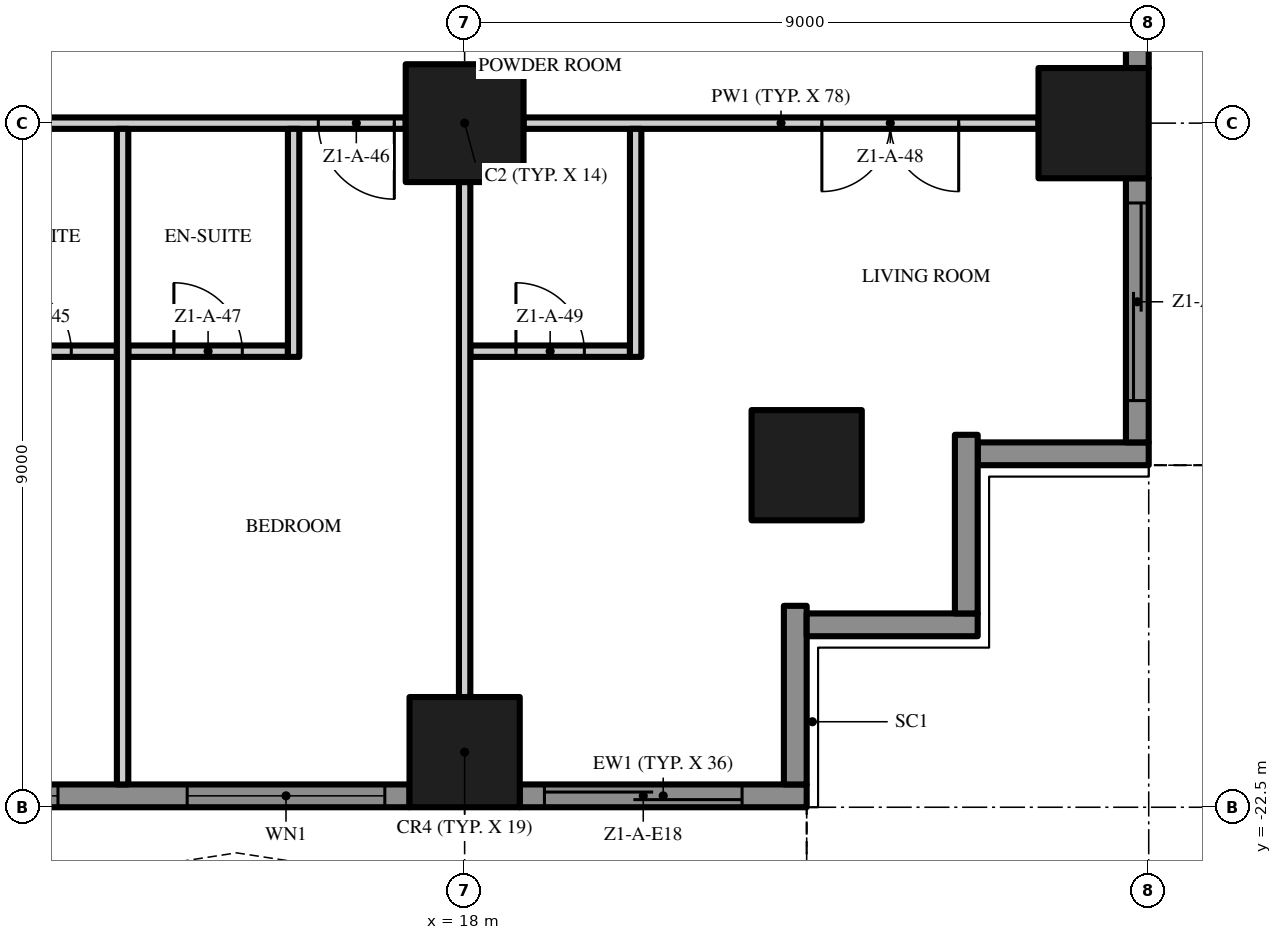
"""IFC4 building model, lengths in metres.
Left out: names, types, materials, properties, quantities, classifications, styles, units other than length and angle.
Written with IfcOpenShell. Run it as: python <this file> out.ifc"""

import sys

from ifc_helpers import new_model, si_unit, direction, frame, frame_2d, origin, origin_2d, place, context, subcontext, project, spatial, polyline, rectangle, outline, extrude, element, fill, save


model = new_model("IFC4")
c1 = context("Model", 3, precision=1e-05, world=origin(), true_north=direction((0.0, 1.0)))
c2 = subcontext(c1, "Body", "Model", "MODEL_VIEW")
j1 = project(units=[si_unit("LENGTHUNIT", "METRE"), si_unit("PLANEANGLEUNIT", "RADIAN")], contexts=[c1])
p1 = place(None, origin())
s1 = spatial("IfcSite", under=j1, at=p1, CompositionType="ELEMENT")
p2 = place(p1, origin())
s2 = spatial("IfcBuilding", under=s1, at=p2, CompositionType="ELEMENT")
p3 = place(p2, frame((0.0, 0.0, 22.6)))
s3 = spatial("IfcBuildingStorey", under=s2, at=p3, CompositionType="ELEMENT", Elevation=22.6)
p4 = place(p3, frame((18.0, -13.5, 0.0), z_axis=(0.0, 0.0, 1.0), x_axis=(1.0, 0.0, 0.0)))
e1 = element("IfcColumn", 1, at=p4, inside=s3, PredefinedType="COLUMN", context=c2, shape_type="SweptSolid", body=[
    extrude(rectangle(XDim=1.55, YDim=1.55, at=origin_2d()), origin(), (0.0, 0.0, 1.0), 3.5),
])
for number, where, z_axis, x_axis in (
    (2, (18.0, -21.775, 0.0), (0.0, 0.0, 1.0), (1.0, 0.0, 0.0)),
    (3, (26.275, -13.5, 0.0), (0.0, 0.0, 1.0), (1.0, 0.0, 0.0)),
    (4, (22.5, -18.0, 0.0), (0.0, 0.0, 1.0), (1.0, 0.0, 0.0)),
):
    element("IfcColumn", number, at=place(p3, frame(where, z_axis=z_axis, x_axis=x_axis)), inside=s3, PredefinedType="COLUMN", context=c2, shape_type="SweptSolid", body=[
        extrude(rectangle(XDim=1.45, YDim=1.45, at=origin_2d()), origin(), (0.0, 0.0, 1.0), 3.5),
    ])
p5 = place(p3, frame((17.275, -22.35, 0.0), z_axis=(0.0, 0.0, 1.0), x_axis=(-1.0, 0.0, 0.0)))
e5 = element("IfcWall", 5, at=p5, inside=s3, PredefinedType="SOLIDWALL", context=c2, shape_type="SweptSolid", body=[
    extrude(rectangle(XDim=7.55, YDim=0.3, at=frame_2d((3.775, 0.0))), origin(), (0.0, 0.0, 1.0), 3.5),
])
p6 = place(p5, frame((4.625, 0.0, 0.45)))
e6 = element("IfcOpeningElement", 6, at=p6, cuts=e5, PredefinedType="OPENING", context=c2, shape_type="SweptSolid", body=[
    extrude(rectangle(XDim=2.6, YDim=2.65, at=frame_2d((1.3, 1.325))), frame((0.0, 0.16, 0.0), z_axis=(0.0, -1.0, 0.0), x_axis=(1.0, 0.0, 0.0)), (0.0, 0.0, 1.0), 0.32),
])
p7 = place(p5, frame((0.325, 0.0, 0.45)))
e7 = element("IfcOpeningElement", 7, at=p7, cuts=e5, PredefinedType="OPENING", context=c2, shape_type="SweptSolid", body=[
    extrude(rectangle(XDim=2.6, YDim=2.65, at=frame_2d((1.3, 1.325))), frame((0.0, 0.16, 0.0), z_axis=(0.0, -1.0, 0.0), x_axis=(1.0, 0.0, 0.0)), (0.0, 0.0, 1.0), 0.32),
])
p8 = place(p3, frame((22.5, -22.35, 0.0), z_axis=(0.0, 0.0, 1.0), x_axis=(-1.0, 0.0, 0.0)))
e8 = element("IfcWall", 8, at=p8, inside=s3, PredefinedType="SOLIDWALL", context=c2, shape_type="SweptSolid", body=[
    extrude(rectangle(XDim=3.775, YDim=0.3, at=frame_2d((1.887, 0.0))), origin(), (0.0, 0.0, 1.0), 3.5),
])
p9 = place(p8, frame((0.85, 0.0, 0.0)))
e9 = element("IfcOpeningElement", 9, at=p9, cuts=e8, PredefinedType="OPENING", context=c2, shape_type="SweptSolid", body=[
    extrude(rectangle(XDim=2.6, YDim=2.4, at=frame_2d((1.3, 1.2))), frame((0.0, 0.16, 0.0), z_axis=(0.0, -1.0, 0.0), x_axis=(1.0, 0.0, 0.0)), (0.0, 0.0, 1.0), 0.32),
])
p10 = place(p3, frame((22.35, -19.85, 0.0), z_axis=(0.0, 0.0, 1.0), x_axis=(0.0, -1.0, 0.0)))
e10 = element("IfcWall", 10, at=p10, inside=s3, PredefinedType="SOLIDWALL", context=c2, shape_type="SweptSolid", body=[
    extrude(rectangle(XDim=2.35, YDim=0.3, at=frame_2d((1.175, 0.0))), origin(), (0.0, 0.0, 1.0), 3.5),
])
p11 = place(p3, frame((24.75, -20.1, 0.0), z_axis=(0.0, 0.0, 1.0), x_axis=(-1.0, 0.0, 0.0)))
e11 = element("IfcWall", 11, at=p11, inside=s3, PredefinedType="SOLIDWALL", context=c2, shape_type="SweptSolid", body=[
    extrude(rectangle(XDim=2.25, YDim=0.3, at=frame_2d((1.125, 0.0))), origin(), (0.0, 0.0, 1.0), 3.5),
])
p12 = place(p3, frame((24.6, -17.6, 0.0), z_axis=(0.0, 0.0, 1.0), x_axis=(0.0, -1.0, 0.0)))
e12 = element("IfcWall", 12, at=p12, inside=s3, PredefinedType="SOLIDWALL", context=c2, shape_type="SweptSolid", body=[
    extrude(rectangle(XDim=2.35, YDim=0.3, at=frame_2d((1.175, 0.0))), origin(), (0.0, 0.0, 1.0), 3.5),
])
p13 = place(p3, frame((27.0, -17.85, 0.0), z_axis=(0.0, 0.0, 1.0), x_axis=(-1.0, 0.0, 0.0)))
e13 = element("IfcWall", 13, at=p13, inside=s3, PredefinedType="SOLIDWALL", context=c2, shape_type="SweptSolid", body=[
    extrude(rectangle(XDim=2.25, YDim=0.3, at=frame_2d((1.125, 0.0))), origin(), (0.0, 0.0, 1.0), 3.5),
])
p14 = place(p3, frame((26.85, -14.225, 0.0), z_axis=(0.0, 0.0, 1.0), x_axis=(0.0, -1.0, 0.0)))
e14 = element("IfcWall", 14, at=p14, inside=s3, PredefinedType="SOLIDWALL", context=c2, shape_type="SweptSolid", body=[
    extrude(rectangle(XDim=3.475, YDim=0.3, at=frame_2d((1.738, 0.0))), origin(), (0.0, 0.0, 1.0), 3.5),
])
p15 = place(p14, frame((0.325, 0.0, 0.0)))
e15 = element("IfcOpeningElement", 15, at=p15, cuts=e14, PredefinedType="OPENING", context=c2, shape_type="SweptSolid", body=[
    extrude(rectangle(XDim=2.6, YDim=2.4, at=frame_2d((1.3, 1.2))), frame((0.0, 0.16, 0.0), z_axis=(0.0, -1.0, 0.0), x_axis=(1.0, 0.0, 0.0)), (0.0, 0.0, 1.0), 0.32),
])
p16 = place(p3, frame((26.85, -5.225, 0.0), z_axis=(0.0, 0.0, 1.0), x_axis=(0.0, -1.0, 0.0)))
e16 = element("IfcWall", 16, at=p16, inside=s3, PredefinedType="SOLIDWALL", context=c2, shape_type="SweptSolid", body=[
    extrude(rectangle(XDim=7.55, YDim=0.3, at=frame_2d((3.775, 0.0))), origin(), (0.0, 0.0, 1.0), 3.5),
])
p17 = place(p16, frame((4.625, 0.0, 0.45)))
e17 = element("IfcOpeningElement", 17, at=p17, cuts=e16, PredefinedType="OPENING", context=c2, shape_type="SweptSolid", body=[
    extrude(rectangle(XDim=2.6, YDim=2.65, at=frame_2d((1.3, 1.325))), frame((0.0, 0.16, 0.0), z_axis=(0.0, -1.0, 0.0), x_axis=(1.0, 0.0, 0.0)), (0.0, 0.0, 1.0), 0.32),
])
p18 = place(p16, frame((0.325, 0.0, 0.45)))
e18 = element("IfcOpeningElement", 18, at=p18, cuts=e16, PredefinedType="OPENING", context=c2, shape_type="SweptSolid", body=[
    extrude(rectangle(XDim=2.6, YDim=2.65, at=frame_2d((1.3, 1.325))), frame((0.0, 0.16, 0.0), z_axis=(0.0, -1.0, 0.0), x_axis=(1.0, 0.0, 0.0)), (0.0, 0.0, 1.0), 0.32),
])
p19 = place(p3, origin())
e19 = element("IfcWall", 19, at=p19, inside=s3, PredefinedType="USERDEFINED", context=c2, shape_type="SweptSolid", body=[
    extrude(outline(polyline([(-22.5, -25.5), (-21.0, -25.271), (-19.5, -24.671), (-18.0, -23.929), (-16.5, -23.329), (-15.0, -23.1), (-13.5, -23.329), (-12.0, -23.929), (-10.5, -24.671), (-9.0, -25.271), (-7.5, -25.5), (-6.0, -25.271), (-4.5, -24.671), (-3.0, -23.929), (-1.5, -23.329), (0.0, -23.1), (1.5, -23.329), (3.0, -23.929), (4.5, -24.671), (6.0, -25.271), (7.5, -25.5), (9.0, -25.271), (10.5, -24.671), (12.0, -23.929), (13.5, -23.329), (15.0, -23.1), (16.5, -23.329), (18.0, -23.929), (19.5, -24.671), (21.0, -25.271), (22.5, -25.5), (22.538, -25.253), (21.066, -25.028), (19.602, -24.442), (18.102, -23.701), (16.566, -23.086), (15.0, -22.847), (13.434, -23.086), (11.898, -23.701), (10.398, -24.442), (8.934, -25.028), (7.5, -25.247), (6.066, -25.028), (4.602, -24.442), (3.102, -23.701), (1.566, -23.086), (0.0, -22.847), (-1.566, -23.086), (-3.102, -23.701), (-4.602, -24.442), (-6.066, -25.028), (-7.5, -25.247), (-8.934, -25.028), (-10.398, -24.442), (-11.898, -23.701), (-13.434, -23.086), (-15.0, -22.847), (-16.566, -23.086), (-18.102, -23.701), (-19.602, -24.442), (-21.066, -25.028), (-22.538, -25.253), (-22.5, -25.5)])), origin(), (0.0, 0.0, 1.0), 0.9),
])
p20 = place(p3, origin())
e20 = element("IfcWall", 20, at=p20, inside=s3, PredefinedType="USERDEFINED", context=c2, shape_type="SweptSolid", body=[
    extrude(outline(polyline([(30.0, -18.0), (29.771, -16.5), (29.171, -15.0), (28.429, -13.5), (27.829, -12.0), (27.6, -10.5), (27.829, -9.0), (28.429, -7.5), (29.171, -6.0), (29.771, -4.5), (30.0, -3.0), (29.771, -1.5), (29.171, 0.0), (28.429, 1.5), (27.829, 3.0), (27.6, 4.5), (27.829, 6.0), (28.429, 7.5), (29.171, 9.0), (29.771, 10.5), (30.0, 12.0), (29.771, 13.5), (29.171, 15.0), (28.429, 16.5), (27.829, 18.0), (27.597, 17.907), (28.201, 16.398), (28.942, 14.898), (29.528, 13.434), (29.747, 12.0), (29.528, 10.566), (28.942, 9.102), (28.201, 7.602), (27.586, 6.066), (27.347, 4.5), (27.586, 2.934), (28.201, 1.398), (28.942, -0.102), (29.528, -1.566), (29.747, -3.0), (29.528, -4.434), (28.942, -5.898), (28.201, -7.398), (27.586, -8.934), (27.347, -10.5), (27.586, -12.066), (28.201, -13.602), (28.942, -15.102), (29.528, -16.566), (29.753, -18.038), (30.0, -18.0)])), origin(), (0.0, 0.0, 1.0), 0.9),
])
p21 = place(p3, frame((11.325, -16.5, 0.0), z_axis=(0.0, 0.0, 1.0), x_axis=(1.0, 0.0, 0.0)))
e21 = element("IfcWall", 21, at=p21, inside=s3, PredefinedType="PARTITIONING", context=c2, shape_type="SweptSolid", body=[
    extrude(rectangle(XDim=2.1, YDim=0.15, at=frame_2d((1.05, 0.0))), origin(), (0.0, 0.0, 1.0), 3.5),
])
p22 = place(p21, frame((0.6, 0.0, 0.0)))
e22 = element("IfcOpeningElement", 22, at=p22, cuts=e21, PredefinedType="OPENING", context=c2, shape_type="SweptSolid", body=[
    extrude(rectangle(XDim=0.9, YDim=2.1, at=frame_2d((0.45, 1.05))), frame((0.0, 0.085, 0.0), z_axis=(0.0, -1.0, 0.0), x_axis=(1.0, 0.0, 0.0)), (0.0, 0.0, 1.0), 0.17),
])
p23 = place(p3, frame((13.575, -16.5, 0.0), z_axis=(0.0, 0.0, 1.0), x_axis=(1.0, 0.0, 0.0)))
e23 = element("IfcWall", 23, at=p23, inside=s3, PredefinedType="PARTITIONING", context=c2, shape_type="SweptSolid", body=[
    extrude(rectangle(XDim=2.1, YDim=0.15, at=frame_2d((1.05, 0.0))), origin(), (0.0, 0.0, 1.0), 3.5),
])
p24 = place(p23, frame((0.6, 0.0, 0.0)))
e24 = element("IfcOpeningElement", 24, at=p24, cuts=e23, PredefinedType="OPENING", context=c2, shape_type="SweptSolid", body=[
    extrude(rectangle(XDim=0.9, YDim=2.1, at=frame_2d((0.45, 1.05))), frame((0.0, 0.085, 0.0), z_axis=(0.0, -1.0, 0.0), x_axis=(1.0, 0.0, 0.0)), (0.0, 0.0, 1.0), 0.17),
])
p25 = place(p3, frame((18.075, -16.5, 0.0), z_axis=(0.0, 0.0, 1.0), x_axis=(1.0, 0.0, 0.0)))
e25 = element("IfcWall", 25, at=p25, inside=s3, PredefinedType="PARTITIONING", context=c2, shape_type="SweptSolid", body=[
    extrude(rectangle(XDim=2.1, YDim=0.15, at=frame_2d((1.05, 0.0))), origin(), (0.0, 0.0, 1.0), 3.5),
])
p26 = place(p25, frame((0.6, 0.0, 0.0)))
e26 = element("IfcOpeningElement", 26, at=p26, cuts=e25, PredefinedType="OPENING", context=c2, shape_type="SweptSolid", body=[
    extrude(rectangle(XDim=0.9, YDim=2.1, at=frame_2d((0.45, 1.05))), frame((0.0, 0.085, 0.0), z_axis=(0.0, -1.0, 0.0), x_axis=(1.0, 0.0, 0.0)), (0.0, 0.0, 1.0), 0.17),
])
p27 = place(p3, frame((17.225, -13.5, 0.0), z_axis=(0.0, 0.0, 1.0), x_axis=(-1.0, 0.0, 0.0)))
e27 = element("IfcWall", 27, at=p27, inside=s3, PredefinedType="PARTITIONING", context=c2, shape_type="SweptSolid", body=[
    extrude(rectangle(XDim=7.45, YDim=0.15, at=frame_2d((3.725, 0.0))), origin(), (0.0, 0.0, 1.0), 3.5),
])
p28 = place(p27, frame((6.3, 0.0, 0.0)))
e28 = element("IfcOpeningElement", 28, at=p28, cuts=e27, PredefinedType="OPENING", context=c2, shape_type="SweptSolid", body=[
    extrude(rectangle(XDim=1.0, YDim=2.4, at=frame_2d((0.5, 1.2))), frame((0.0, 0.085, 0.0), z_axis=(0.0, -1.0, 0.0), x_axis=(1.0, 0.0, 0.0)), (0.0, 0.0, 1.0), 0.17),
])
p29 = place(p27, frame((0.15, 0.0, 0.0)))
e29 = element("IfcOpeningElement", 29, at=p29, cuts=e27, PredefinedType="OPENING", context=c2, shape_type="SweptSolid", body=[
    extrude(rectangle(XDim=1.0, YDim=2.4, at=frame_2d((0.5, 1.2))), frame((0.0, 0.085, 0.0), z_axis=(0.0, -1.0, 0.0), x_axis=(1.0, 0.0, 0.0)), (0.0, 0.0, 1.0), 0.17),
])
p30 = place(p3, frame((25.55, -13.5, 0.0), z_axis=(0.0, 0.0, 1.0), x_axis=(-1.0, 0.0, 0.0)))
e30 = element("IfcWall", 30, at=p30, inside=s3, PredefinedType="PARTITIONING", context=c2, shape_type="SweptSolid", body=[
    extrude(rectangle(XDim=6.775, YDim=0.15, at=frame_2d((3.388, 0.0))), origin(), (0.0, 0.0, 1.0), 3.5),
])
p31 = place(p30, frame((1.05, 0.0, 0.0)))
e31 = element("IfcOpeningElement", 31, at=p31, cuts=e30, PredefinedType="OPENING", context=c2, shape_type="SweptSolid", body=[
    extrude(rectangle(XDim=1.8, YDim=2.4, at=frame_2d((0.9, 1.2))), frame((0.0, 0.085, 0.0), z_axis=(0.0, -1.0, 0.0), x_axis=(1.0, 0.0, 0.0)), (0.0, 0.0, 1.0), 0.17),
])
p32 = place(p3, frame((13.5, -22.2, 0.0), z_axis=(0.0, 0.0, 1.0), x_axis=(0.0, 1.0, 0.0)))
e32 = element("IfcWall", 32, at=p32, inside=s3, PredefinedType="PARTITIONING", context=c2, shape_type="SweptSolid", body=[
    extrude(rectangle(XDim=8.625, YDim=0.15, at=frame_2d((4.312, 0.0))), origin(), (0.0, 0.0, 1.0), 3.5),
])
p33 = place(p3, frame((15.75, -16.575, 0.0), z_axis=(0.0, 0.0, 1.0), x_axis=(0.0, 1.0, 0.0)))
e33 = element("IfcWall", 33, at=p33, inside=s3, PredefinedType="PARTITIONING", context=c2, shape_type="SweptSolid", body=[
    extrude(rectangle(XDim=3.0, YDim=0.15, at=frame_2d((1.5, 0.0))), origin(), (0.0, 0.0, 1.0), 3.5),
])
p34 = place(p3, frame((18.0, -21.05, 0.0), z_axis=(0.0, 0.0, 1.0), x_axis=(0.0, 1.0, 0.0)))
e34 = element("IfcWall", 34, at=p34, inside=s3, PredefinedType="PARTITIONING", context=c2, shape_type="SweptSolid", body=[
    extrude(rectangle(XDim=6.775, YDim=0.15, at=frame_2d((3.388, 0.0))), origin(), (0.0, 0.0, 1.0), 3.5),
])
p35 = place(p3, frame((20.25, -16.575, 0.0), z_axis=(0.0, 0.0, 1.0), x_axis=(0.0, 1.0, 0.0)))
e35 = element("IfcWall", 35, at=p35, inside=s3, PredefinedType="PARTITIONING", context=c2, shape_type="SweptSolid", body=[
    extrude(rectangle(XDim=3.0, YDim=0.15, at=frame_2d((1.5, 0.0))), origin(), (0.0, 0.0, 1.0), 3.5),
])
p36 = place(p6, origin())
e36 = element("IfcWindow", 36, at=p36, inside=s3, PartitioningType="SINGLE_PANEL", PredefinedType="WINDOW", context=c2, shape_type="SweptSolid", body=[
    extrude(rectangle(XDim=2.6, YDim=2.65, at=frame_2d((1.3, 1.325))), frame((0.0, 0.03, 0.0), z_axis=(0.0, -1.0, 0.0), x_axis=(1.0, 0.0, 0.0)), (0.0, 0.0, 1.0), 0.06),
])
fill(e6, e36)
p37 = place(p7, origin())
e37 = element("IfcWindow", 37, at=p37, inside=s3, PartitioningType="SINGLE_PANEL", PredefinedType="WINDOW", context=c2, shape_type="SweptSolid", body=[
    extrude(rectangle(XDim=2.6, YDim=2.65, at=frame_2d((1.3, 1.325))), frame((0.0, 0.03, 0.0), z_axis=(0.0, -1.0, 0.0), x_axis=(1.0, 0.0, 0.0)), (0.0, 0.0, 1.0), 0.06),
])
fill(e7, e37)
p38 = place(p9, origin())
e38 = element("IfcDoor", 38, at=p38, inside=s3, OperationType="SINGLE_SWING_LEFT", PredefinedType="DOOR", context=c2, shape_type="SweptSolid", body=[
    extrude(rectangle(XDim=2.6, YDim=2.4, at=frame_2d((1.3, 1.2))), frame((0.0, 0.025, 0.0), z_axis=(0.0, -1.0, 0.0), x_axis=(1.0, 0.0, 0.0)), (0.0, 0.0, 1.0), 0.05),
])
fill(e9, e38)
p39 = place(p15, origin())
e39 = element("IfcDoor", 39, at=p39, inside=s3, OperationType="SINGLE_SWING_LEFT", PredefinedType="DOOR", context=c2, shape_type="SweptSolid", body=[
    extrude(rectangle(XDim=2.6, YDim=2.4, at=frame_2d((1.3, 1.2))), frame((0.0, 0.025, 0.0), z_axis=(0.0, -1.0, 0.0), x_axis=(1.0, 0.0, 0.0)), (0.0, 0.0, 1.0), 0.05),
])
fill(e15, e39)
p40 = place(p22, origin())
e40 = element("IfcDoor", 40, at=p40, inside=s3, OperationType="SINGLE_SWING_LEFT", PredefinedType="DOOR", context=c2, shape_type="SweptSolid", body=[
    extrude(rectangle(XDim=0.9, YDim=2.1, at=frame_2d((0.45, 1.05))), frame((0.0, 0.025, 0.0), z_axis=(0.0, -1.0, 0.0), x_axis=(1.0, 0.0, 0.0)), (0.0, 0.0, 1.0), 0.05),
])
fill(e22, e40)
p41 = place(p29, origin())
e41 = element("IfcDoor", 41, at=p41, inside=s3, OperationType="SINGLE_SWING_LEFT", PredefinedType="DOOR", context=c2, shape_type="SweptSolid", body=[
    extrude(rectangle(XDim=1.0, YDim=2.4, at=frame_2d((0.5, 1.2))), frame((0.0, 0.025, 0.0), z_axis=(0.0, -1.0, 0.0), x_axis=(1.0, 0.0, 0.0)), (0.0, 0.0, 1.0), 0.05),
])
fill(e29, e41)
p42 = place(p24, origin())
e42 = element("IfcDoor", 42, at=p42, inside=s3, OperationType="SINGLE_SWING_LEFT", PredefinedType="DOOR", context=c2, shape_type="SweptSolid", body=[
    extrude(rectangle(XDim=0.9, YDim=2.1, at=frame_2d((0.45, 1.05))), frame((0.0, 0.025, 0.0), z_axis=(0.0, -1.0, 0.0), x_axis=(1.0, 0.0, 0.0)), (0.0, 0.0, 1.0), 0.05),
])
fill(e24, e42)
p43 = place(p31, origin())
e43 = element("IfcDoor", 43, at=p43, inside=s3, OperationType="DOUBLE_DOOR_SINGLE_SWING", PredefinedType="DOOR", context=c2, shape_type="SweptSolid", body=[
    extrude(rectangle(XDim=1.8, YDim=2.4, at=frame_2d((0.9, 1.2))), frame((0.0, 0.025, 0.0), z_axis=(0.0, -1.0, 0.0), x_axis=(1.0, 0.0, 0.0)), (0.0, 0.0, 1.0), 0.05),
])
fill(e31, e43)
p44 = place(p26, origin())
e44 = element("IfcDoor", 44, at=p44, inside=s3, OperationType="SINGLE_SWING_LEFT", PredefinedType="DOOR", context=c2, shape_type="SweptSolid", body=[
    extrude(rectangle(XDim=0.9, YDim=2.1, at=frame_2d((0.45, 1.05))), frame((0.0, 0.025, 0.0), z_axis=(0.0, -1.0, 0.0), x_axis=(1.0, 0.0, 0.0)), (0.0, 0.0, 1.0), 0.05),
])
fill(e26, e44)
save(model, sys.argv[1])
